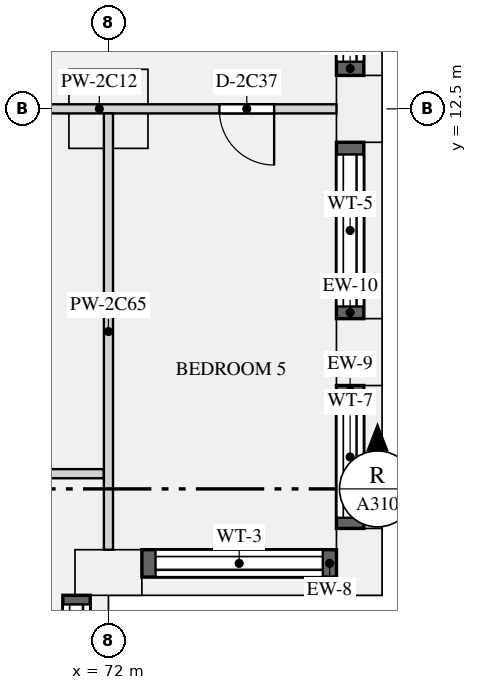
"""IFC4 building model, lengths in metres.
Left out: names, types, materials, properties, quantities, classifications, styles, units other than length and angle.
Written with IfcOpenShell. Run it as: python <this file> out.ifc"""

import sys

from ifc_helpers import new_model, si_unit, direction, frame, frame_2d, origin, origin_2d, place, context, subcontext, project, spatial, rectangle, extrude, element, fill, save


model = new_model("IFC4")
c1 = context("Model", 3, precision=1e-05, world=origin(), true_north=direction((0.0, 1.0)))
c2 = subcontext(c1, "Body", "Model", "MODEL_VIEW")
j1 = project(units=[si_unit("LENGTHUNIT", "METRE"), si_unit("PLANEANGLEUNIT", "RADIAN")], contexts=[c1])
p1 = place(None, origin())
s1 = spatial("IfcSite", under=j1, at=p1, CompositionType="ELEMENT")
p2 = place(p1, origin())
s2 = spatial("IfcBuilding", under=s1, at=p2, CompositionType="ELEMENT")
p3 = place(p2, frame((0.0, 0.0, 102.45)))
s3 = spatial("IfcBuildingStorey", under=s2, at=p3, CompositionType="ELEMENT", Elevation=102.45)
for number, where, z_axis, x_axis in (
    (1, (72.0, 4.875, 0.0), (0.0, 0.0, 1.0), (1.0, 0.0, 0.0)),
    (2, (76.125, 5.05, 0.0), (0.0, 0.0, 1.0), (0.0, 1.0, 0.0)),
    (3, (76.125, 8.5, 0.0), (0.0, 0.0, 1.0), (0.0, 1.0, 0.0)),
    (4, (76.125, 12.5, 0.0), (0.0, 0.0, 1.0), (0.0, 1.0, 0.0)),
):
    element("IfcColumn", number, at=place(p3, frame(where, z_axis=z_axis, x_axis=x_axis)), inside=s3, PredefinedType="USERDEFINED", context=c2, shape_type="SweptSolid", body=[
        extrude(rectangle(XDim=1.1, YDim=0.75, at=origin_2d()), origin(), (0.0, 0.0, 1.0), 3.15),
    ])
p4 = place(p3, frame((72.0, 12.5, 0.0), z_axis=(0.0, 0.0, 1.0), x_axis=(1.0, 0.0, 0.0)))
e5 = element("IfcColumn", 5, at=p4, inside=s3, PredefinedType="COLUMN", context=c2, shape_type="SweptSolid", body=[
    extrude(rectangle(XDim=1.3, YDim=1.3, at=origin_2d()), origin(), (0.0, 0.0, 1.0), 3.15),
])
p5 = place(p3, frame((71.475, 1.1, 0.9), z_axis=(0.0, 0.0, 1.0), x_axis=(0.0, 1.0, 0.0)))
e6 = element("IfcWall", 6, at=p5, inside=s3, PredefinedType="SOLIDWALL", context=c2, shape_type="SweptSolid", body=[
    extrude(rectangle(XDim=3.4, YDim=0.45, at=frame_2d((1.7, 0.0))), origin(), (0.0, 0.0, 1.0), 1.93),
])
p6 = place(p5, frame((0.15, 0.0, 0.15)))
e7 = element("IfcOpeningElement", 7, at=p6, cuts=e6, PredefinedType="OPENING", context=c2, shape_type="SweptSolid", body=[
    extrude(rectangle(XDim=3.1, YDim=1.5, at=frame_2d((1.55, 0.75))), frame((0.0, 0.235, 0.0), z_axis=(0.0, -1.0, 0.0), x_axis=(1.0, 0.0, 0.0)), (0.0, 0.0, 1.0), 0.47),
])
p7 = place(p3, frame((72.55, 5.025, 0.9), z_axis=(0.0, 0.0, 1.0), x_axis=(1.0, 0.0, 0.0)))
e8 = element("IfcWall", 8, at=p7, inside=s3, PredefinedType="SOLIDWALL", context=c2, shape_type="SweptSolid", body=[
    extrude(rectangle(XDim=3.2, YDim=0.45, at=frame_2d((1.6, 0.0))), origin(), (0.0, 0.0, 1.0), 1.93),
])
p8 = place(p7, frame((0.225, 0.0, 0.15)))
e9 = element("IfcOpeningElement", 9, at=p8, cuts=e8, PredefinedType="OPENING", context=c2, shape_type="SweptSolid", body=[
    extrude(rectangle(XDim=2.75, YDim=1.5, at=frame_2d((1.375, 0.75))), frame((0.0, 0.235, 0.0), z_axis=(0.0, -1.0, 0.0), x_axis=(1.0, 0.0, 0.0)), (0.0, 0.0, 1.0), 0.47),
])
p9 = place(p3, frame((75.975, 5.6, 0.9), z_axis=(0.0, 0.0, 1.0), x_axis=(0.0, 1.0, 0.0)))
e10 = element("IfcWall", 10, at=p9, inside=s3, PredefinedType="SOLIDWALL", context=c2, shape_type="SweptSolid", body=[
    extrude(rectangle(XDim=2.35, YDim=0.45, at=frame_2d((1.175, 0.0))), origin(), (0.0, 0.0, 1.0), 1.93),
])
p10 = place(p9, frame((0.175, 0.0, 0.15)))
e11 = element("IfcOpeningElement", 11, at=p10, cuts=e10, PredefinedType="OPENING", context=c2, shape_type="SweptSolid", body=[
    extrude(rectangle(XDim=2.0, YDim=1.5, at=frame_2d((1.0, 0.75))), frame((0.0, 0.235, 0.0), z_axis=(0.0, -1.0, 0.0), x_axis=(1.0, 0.0, 0.0)), (0.0, 0.0, 1.0), 0.47),
])
p11 = place(p3, frame((75.975, 9.05, 0.9), z_axis=(0.0, 0.0, 1.0), x_axis=(0.0, 1.0, 0.0)))
e12 = element("IfcWall", 12, at=p11, inside=s3, PredefinedType="SOLIDWALL", context=c2, shape_type="SweptSolid", body=[
    extrude(rectangle(XDim=2.9, YDim=0.45, at=frame_2d((1.45, 0.0))), origin(), (0.0, 0.0, 1.0), 1.93),
])
p12 = place(p11, frame((0.2, 0.0, 0.15)))
e13 = element("IfcOpeningElement", 13, at=p12, cuts=e12, PredefinedType="OPENING", context=c2, shape_type="SweptSolid", body=[
    extrude(rectangle(XDim=2.5, YDim=1.5, at=frame_2d((1.25, 0.75))), frame((0.0, 0.235, 0.0), z_axis=(0.0, -1.0, 0.0), x_axis=(1.0, 0.0, 0.0)), (0.0, 0.0, 1.0), 0.47),
])
p13 = place(p3, frame((75.975, 13.05, 0.9), z_axis=(0.0, 0.0, 1.0), x_axis=(0.0, 1.0, 0.0)))
e14 = element("IfcWall", 14, at=p13, inside=s3, PredefinedType="SOLIDWALL", context=c2, shape_type="SweptSolid", body=[
    extrude(rectangle(XDim=2.7, YDim=0.45, at=frame_2d((1.35, 0.0))), origin(), (0.0, 0.0, 1.0), 1.93),
])
p14 = place(p13, frame((0.225, 0.0, 0.15)))
e15 = element("IfcOpeningElement", 15, at=p14, cuts=e14, PredefinedType="OPENING", context=c2, shape_type="SweptSolid", body=[
    extrude(rectangle(XDim=2.25, YDim=1.5, at=frame_2d((1.125, 0.75))), frame((0.0, 0.235, 0.0), z_axis=(0.0, -1.0, 0.0), x_axis=(1.0, 0.0, 0.0)), (0.0, 0.0, 1.0), 0.47),
])
p15 = place(p3, frame((62.925, 12.5, 0.0), z_axis=(0.0, 0.0, 1.0), x_axis=(1.0, 0.0, 0.0)))
e16 = element("IfcWall", 16, at=p15, inside=s3, PredefinedType="PARTITIONING", context=c2, shape_type="SweptSolid", body=[
    extrude(rectangle(XDim=12.825, YDim=0.15, at=frame_2d((6.413, 0.0))), origin(), (0.0, 0.0, 1.0), 2.83),
])
p16 = place(p15, frame((6.05, 0.0, 0.0)))
e17 = element("IfcOpeningElement", 17, at=p16, cuts=e16, PredefinedType="OPENING", context=c2, shape_type="SweptSolid", body=[
    extrude(rectangle(XDim=0.9, YDim=2.1, at=frame_2d((0.45, 1.05))), frame((0.0, 0.085, 0.0), z_axis=(0.0, -1.0, 0.0), x_axis=(1.0, 0.0, 0.0)), (0.0, 0.0, 1.0), 0.17),
])
p17 = place(p15, frame((2.2, 0.0, 0.0)))
e18 = element("IfcOpeningElement", 18, at=p17, cuts=e16, PredefinedType="OPENING", context=c2, shape_type="SweptSolid", body=[
    extrude(rectangle(XDim=0.9, YDim=2.1, at=frame_2d((0.45, 1.05))), frame((0.0, 0.085, 0.0), z_axis=(0.0, -1.0, 0.0), x_axis=(1.0, 0.0, 0.0)), (0.0, 0.0, 1.0), 0.17),
])
p18 = place(p15, frame((10.9, 0.0, 0.0)))
e19 = element("IfcOpeningElement", 19, at=p18, cuts=e16, PredefinedType="OPENING", context=c2, shape_type="SweptSolid", body=[
    extrude(rectangle(XDim=0.9, YDim=2.1, at=frame_2d((0.45, 1.05))), frame((0.0, 0.085, 0.0), z_axis=(0.0, -1.0, 0.0), x_axis=(1.0, 0.0, 0.0)), (0.0, 0.0, 1.0), 0.17),
])
p19 = place(p3, frame((67.575, 6.5, 0.0), z_axis=(0.0, 0.0, 1.0), x_axis=(1.0, 0.0, 0.0)))
e20 = element("IfcWall", 20, at=p19, inside=s3, PredefinedType="PARTITIONING", context=c2, shape_type="SweptSolid", body=[
    extrude(rectangle(XDim=4.35, YDim=0.15, at=frame_2d((2.175, 0.0))), origin(), (0.0, 0.0, 1.0), 2.83),
])
p20 = place(p3, frame((72.0, 5.25, 0.0), z_axis=(0.0, 0.0, 1.0), x_axis=(0.0, 1.0, 0.0)))
e21 = element("IfcWall", 21, at=p20, inside=s3, PredefinedType="PARTITIONING", context=c2, shape_type="SweptSolid", body=[
    extrude(rectangle(XDim=7.175, YDim=0.15, at=frame_2d((3.587, 0.0))), origin(), (0.0, 0.0, 1.0), 2.83),
])
p21 = place(p6, origin())
e22 = element("IfcWindow", 22, at=p21, inside=s3, PartitioningType="SINGLE_PANEL", PredefinedType="WINDOW", context=c2, shape_type="SweptSolid", body=[
    extrude(rectangle(XDim=3.1, YDim=1.5, at=frame_2d((1.55, 0.75))), frame((0.0, -0.065, 0.0), z_axis=(0.0, -1.0, 0.0), x_axis=(1.0, 0.0, 0.0)), (0.0, 0.0, 1.0), 0.06),
])
fill(e7, e22)
p22 = place(p8, origin())
e23 = element("IfcWindow", 23, at=p22, inside=s3, PartitioningType="SINGLE_PANEL", PredefinedType="WINDOW", context=c2, shape_type="SweptSolid", body=[
    extrude(rectangle(XDim=2.75, YDim=1.5, at=frame_2d((1.375, 0.75))), frame((0.0, -0.065, 0.0), z_axis=(0.0, -1.0, 0.0), x_axis=(1.0, 0.0, 0.0)), (0.0, 0.0, 1.0), 0.06),
])
fill(e9, e23)
p23 = place(p10, origin())
e24 = element("IfcWindow", 24, at=p23, inside=s3, PartitioningType="SINGLE_PANEL", PredefinedType="WINDOW", context=c2, shape_type="SweptSolid", body=[
    extrude(rectangle(XDim=2.0, YDim=1.5, at=frame_2d((1.0, 0.75))), frame((0.0, -0.065, 0.0), z_axis=(0.0, -1.0, 0.0), x_axis=(1.0, 0.0, 0.0)), (0.0, 0.0, 1.0), 0.06),
])
fill(e11, e24)
p24 = place(p12, origin())
e25 = element("IfcWindow", 25, at=p24, inside=s3, PartitioningType="SINGLE_PANEL", PredefinedType="WINDOW", context=c2, shape_type="SweptSolid", body=[
    extrude(rectangle(XDim=2.5, YDim=1.5, at=frame_2d((1.25, 0.75))), frame((0.0, -0.065, 0.0), z_axis=(0.0, -1.0, 0.0), x_axis=(1.0, 0.0, 0.0)), (0.0, 0.0, 1.0), 0.06),
])
fill(e13, e25)
p25 = place(p14, origin())
e26 = element("IfcWindow", 26, at=p25, inside=s3, PartitioningType="SINGLE_PANEL", PredefinedType="WINDOW", context=c2, shape_type="SweptSolid", body=[
    extrude(rectangle(XDim=2.25, YDim=1.5, at=frame_2d((1.125, 0.75))), frame((0.0, -0.065, 0.0), z_axis=(0.0, -1.0, 0.0), x_axis=(1.0, 0.0, 0.0)), (0.0, 0.0, 1.0), 0.06),
])
fill(e15, e26)
p26 = place(p18, frame((0.9, 0.0, 0.0), z_axis=(0.0, 0.0, 1.0), x_axis=(-1.0, 0.0, 0.0)))
e27 = element("IfcDoor", 27, at=p26, inside=s3, OperationType="SINGLE_SWING_LEFT", PredefinedType="DOOR", context=c2, shape_type="SweptSolid", body=[
    extrude(rectangle(XDim=0.9, YDim=2.1, at=frame_2d((0.45, 1.05))), frame((0.0, 0.025, 0.0), z_axis=(0.0, -1.0, 0.0), x_axis=(1.0, 0.0, 0.0)), (0.0, 0.0, 1.0), 0.05),
])
fill(e19, e27)
save(model, sys.argv[1])
